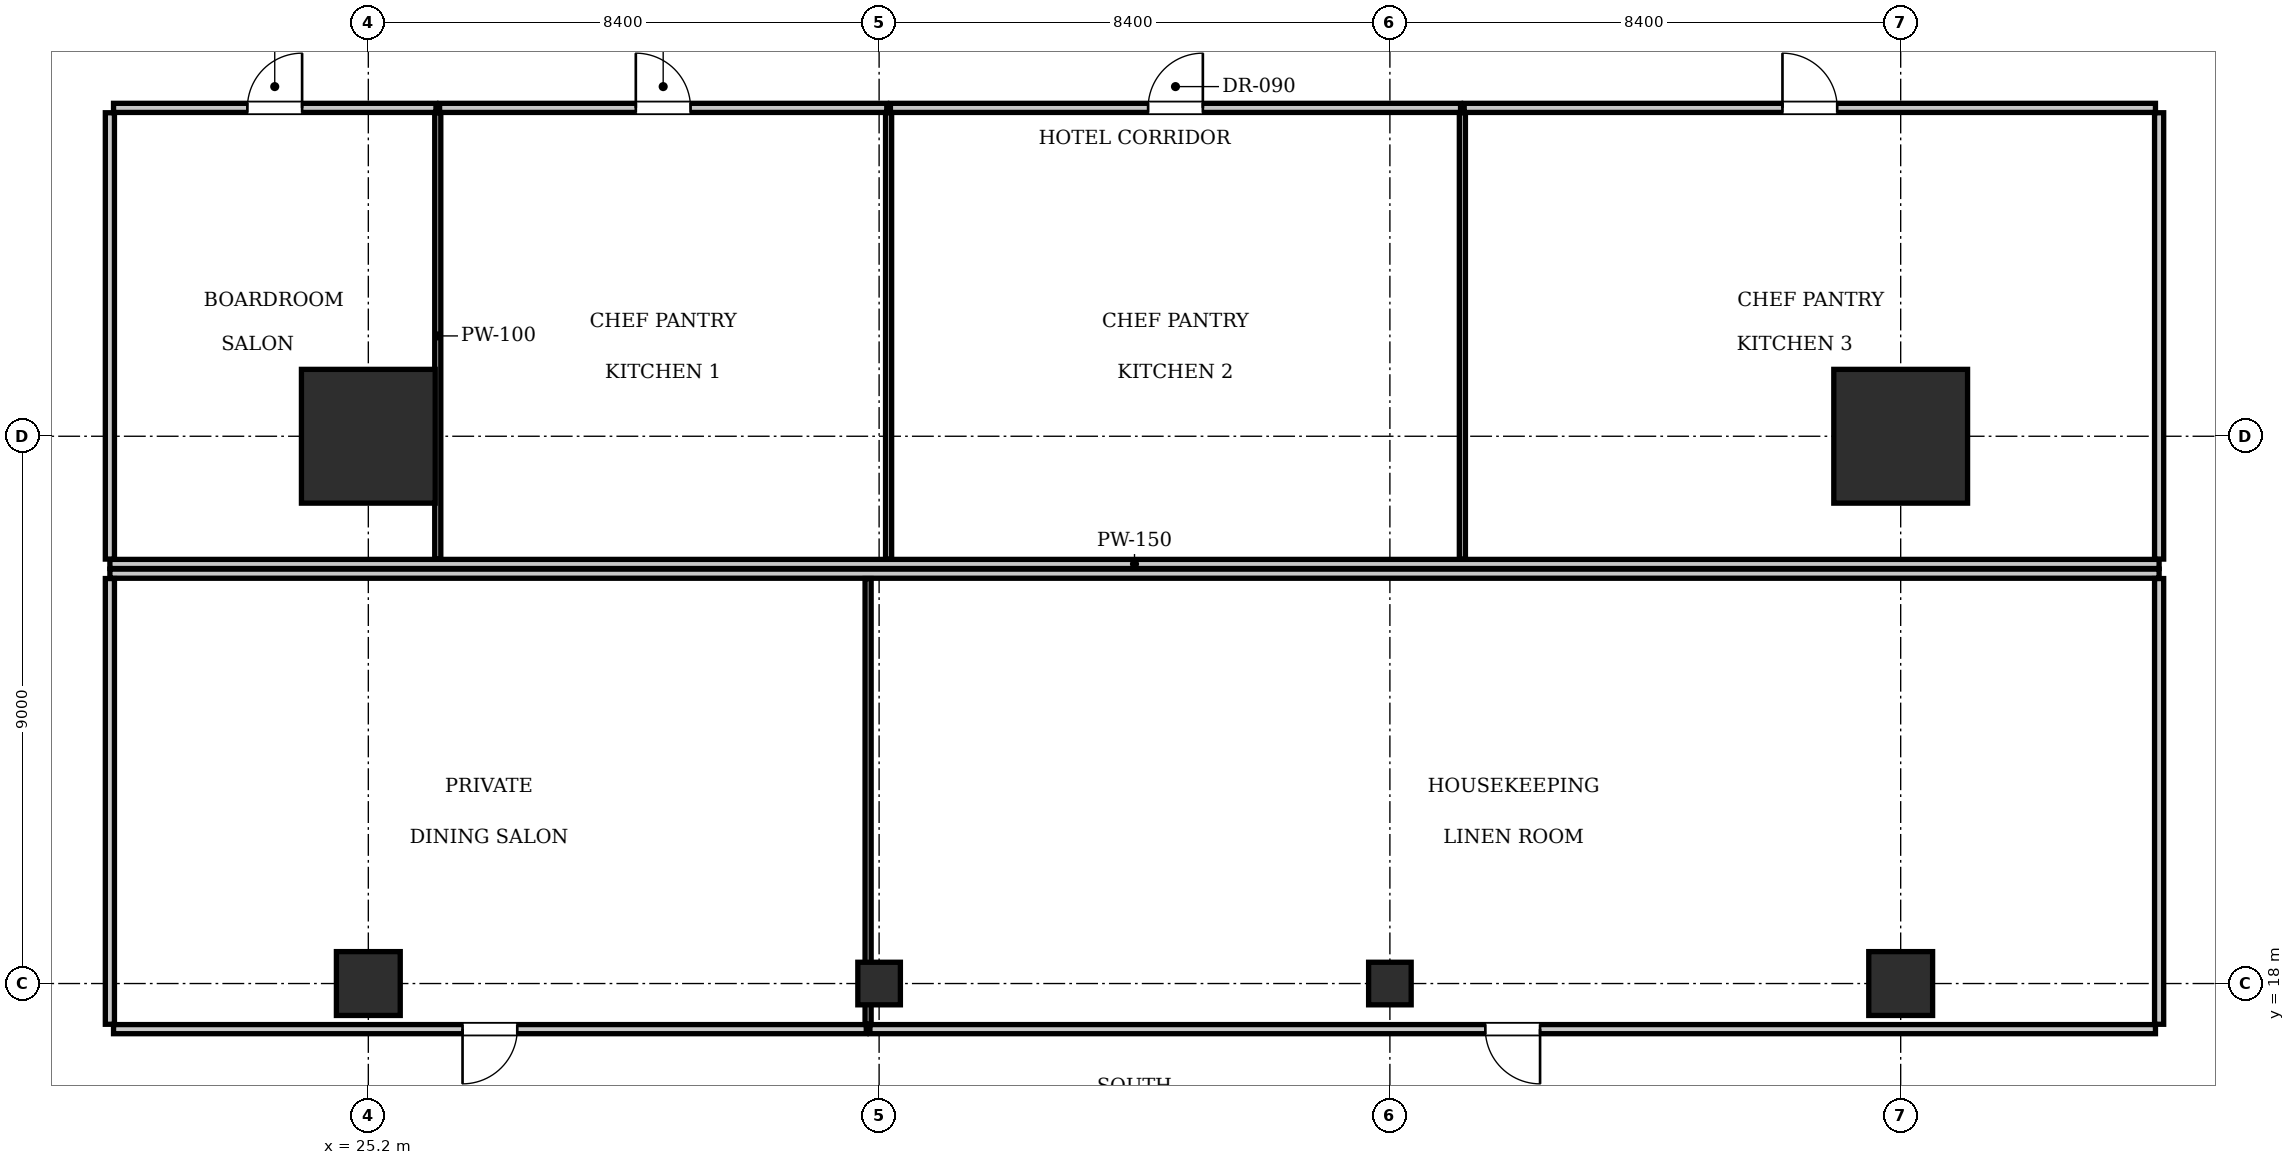
"""IFC4 building model, lengths in metres.
Left out: names, types, materials, properties, quantities, classifications, styles, units other than length and angle.
Written with IfcOpenShell. Run it as: python <this file> out.ifc"""

import sys

from ifc_helpers import new_model, si_unit, direction, frame, frame_2d, origin, origin_2d, place, context, subcontext, project, spatial, rectangle, i_section, extrude, element, fill, save


model = new_model("IFC4")
c1 = context("Model", 3, precision=1e-05, world=origin(), true_north=direction((0.0, 1.0)))
c2 = subcontext(c1, "Body", "Model", "MODEL_VIEW")
j1 = project(units=[si_unit("LENGTHUNIT", "METRE"), si_unit("PLANEANGLEUNIT", "RADIAN")], contexts=[c1])
p1 = place(None, origin())
s1 = spatial("IfcSite", under=j1, at=p1, CompositionType="ELEMENT")
p2 = place(p1, origin())
s2 = spatial("IfcBuilding", under=s1, at=p2, CompositionType="ELEMENT")
p3 = place(p2, frame((0.0, 0.0, 107.8)))
s3 = spatial("IfcBuildingStorey", under=s2, at=p3, CompositionType="ELEMENT", Elevation=107.8)
for number, where, z_axis, x_axis in (
    (1, (25.2, 27.0, 0.0), (0.0, 0.0, 1.0), (1.0, 0.0, 0.0)),
    (2, (50.4, 27.0, 0.0), (0.0, 0.0, 1.0), (1.0, 0.0, 0.0)),
):
    element("IfcColumn", number, at=place(p3, frame(where, z_axis=z_axis, x_axis=x_axis)), inside=s3, PredefinedType="COLUMN", context=c2, shape_type="SweptSolid", body=[
        extrude(rectangle(XDim=2.2, YDim=2.2, at=origin_2d()), origin(), (0.0, 0.0, 1.0), 3.85),
    ])
for number, where, z_axis, x_axis in (
    (3, (25.2, 18.0, 0.0), (0.0, 0.0, 1.0), (1.0, 0.0, 0.0)),
    (4, (50.4, 18.0, 0.0), (0.0, 0.0, 1.0), (1.0, 0.0, 0.0)),
):
    element("IfcColumn", number, at=place(p3, frame(where, z_axis=z_axis, x_axis=x_axis)), inside=s3, PredefinedType="COLUMN", context=c2, shape_type="SweptSolid", body=[
        extrude(rectangle(XDim=1.05, YDim=1.05, at=origin_2d()), origin(), (0.0, 0.0, 1.0), 3.85),
    ])
for number, where, z_axis, x_axis in (
    (5, (33.6, 18.0, 0.0), (0.0, 0.0, 1.0), (1.0, 0.0, 0.0)),
    (6, (42.0, 18.0, 0.0), (0.0, 0.0, 1.0), (1.0, 0.0, 0.0)),
):
    element("IfcColumn", number, at=place(p3, frame(where, z_axis=z_axis, x_axis=x_axis)), inside=s3, PredefinedType="COLUMN", context=c2, shape_type="SweptSolid", body=[
        extrude(i_section(OverallWidth=0.7, OverallDepth=0.7, WebThickness=0.028, FlangeThickness=0.044, at=origin_2d()), origin(), (0.0, 0.0, 1.0), 3.85),
    ])
p4 = place(p3, frame((20.95, 24.9, 0.0), z_axis=(0.0, 0.0, 1.0), x_axis=(1.0, 0.0, 0.0)))
e7 = element("IfcWall", 7, at=p4, inside=s3, PredefinedType="PARTITIONING", context=c2, shape_type="SweptSolid", body=[
    extrude(rectangle(XDim=33.7, YDim=0.15, at=frame_2d((16.85, 0.0))), origin(), (0.0, 0.0, 1.0), 3.61),
])
p5 = place(p3, frame((20.95, 24.98, 0.0), z_axis=(0.0, 0.0, 1.0), x_axis=(0.0, 1.0, 0.0)))
e8 = element("IfcWall", 8, at=p5, inside=s3, PredefinedType="PARTITIONING", context=c2, shape_type="SweptSolid", body=[
    extrude(rectangle(XDim=7.34, YDim=0.15, at=frame_2d((3.67, 0.0))), origin(), (0.0, 0.0, 1.0), 3.293),
])
p6 = place(p3, frame((54.65, 24.98, 0.0), z_axis=(0.0, 0.0, 1.0), x_axis=(0.0, 1.0, 0.0)))
e9 = element("IfcWall", 9, at=p6, inside=s3, PredefinedType="PARTITIONING", context=c2, shape_type="SweptSolid", body=[
    extrude(rectangle(XDim=7.34, YDim=0.15, at=frame_2d((3.67, 0.0))), origin(), (0.0, 0.0, 1.0), 3.3),
])
p7 = place(p3, frame((21.01, 32.4, 0.0), z_axis=(0.0, 0.0, 1.0), x_axis=(1.0, 0.0, 0.0)))
e10 = element("IfcWall", 10, at=p7, inside=s3, PredefinedType="PARTITIONING", context=c2, shape_type="SweptSolid", body=[
    extrude(rectangle(XDim=5.302, YDim=0.15, at=frame_2d((2.651, 0.0))), origin(), (0.0, 0.0, 1.0), 3.61),
])
p8 = place(p7, frame((2.201, 0.0, 0.0)))
e11 = element("IfcOpeningElement", 11, at=p8, cuts=e10, PredefinedType="OPENING", context=c2, shape_type="SweptSolid", body=[
    extrude(rectangle(XDim=0.9, YDim=2.1, at=frame_2d((0.45, 1.05))), frame((0.0, 0.085, 0.0), z_axis=(0.0, -1.0, 0.0), x_axis=(1.0, 0.0, 0.0)), (0.0, 0.0, 1.0), 0.17),
])
p9 = place(p3, frame((26.342, 24.98, 0.0), z_axis=(0.0, 0.0, 1.0), x_axis=(0.0, 1.0, 0.0)))
e12 = element("IfcWall", 12, at=p9, inside=s3, PredefinedType="PARTITIONING", context=c2, shape_type="SweptSolid", body=[
    extrude(rectangle(XDim=7.34, YDim=0.1, at=frame_2d((3.67, 0.0))), origin(), (0.0, 0.0, 1.0), 3.61),
])
p10 = place(p3, frame((26.372, 32.4, 0.0), z_axis=(0.0, 0.0, 1.0), x_axis=(1.0, 0.0, 0.0)))
e13 = element("IfcWall", 13, at=p10, inside=s3, PredefinedType="PARTITIONING", context=c2, shape_type="SweptSolid", body=[
    extrude(rectangle(XDim=7.354, YDim=0.15, at=frame_2d((3.677, 0.0))), origin(), (0.0, 0.0, 1.0), 3.61),
])
p11 = place(p10, frame((3.227, 0.0, 0.0)))
e14 = element("IfcOpeningElement", 14, at=p11, cuts=e13, PredefinedType="OPENING", context=c2, shape_type="SweptSolid", body=[
    extrude(rectangle(XDim=0.9, YDim=2.1, at=frame_2d((0.45, 1.05))), frame((0.0, 0.085, 0.0), z_axis=(0.0, -1.0, 0.0), x_axis=(1.0, 0.0, 0.0)), (0.0, 0.0, 1.0), 0.17),
])
p12 = place(p3, frame((33.756, 24.98, 0.0), z_axis=(0.0, 0.0, 1.0), x_axis=(0.0, 1.0, 0.0)))
e15 = element("IfcWall", 15, at=p12, inside=s3, PredefinedType="PARTITIONING", context=c2, shape_type="SweptSolid", body=[
    extrude(rectangle(XDim=7.34, YDim=0.1, at=frame_2d((3.67, 0.0))), origin(), (0.0, 0.0, 1.0), 2.999),
])
p13 = place(p3, frame((33.786, 32.4, 0.0), z_axis=(0.0, 0.0, 1.0), x_axis=(1.0, 0.0, 0.0)))
e16 = element("IfcWall", 16, at=p13, inside=s3, PredefinedType="PARTITIONING", context=c2, shape_type="SweptSolid", body=[
    extrude(rectangle(XDim=9.376, YDim=0.15, at=frame_2d((4.688, 0.0))), origin(), (0.0, 0.0, 1.0), 3.61),
])
p14 = place(p13, frame((4.238, 0.0, 0.0)))
e17 = element("IfcOpeningElement", 17, at=p14, cuts=e16, PredefinedType="OPENING", context=c2, shape_type="SweptSolid", body=[
    extrude(rectangle(XDim=0.9, YDim=2.1, at=frame_2d((0.45, 1.05))), frame((0.0, 0.085, 0.0), z_axis=(0.0, -1.0, 0.0), x_axis=(1.0, 0.0, 0.0)), (0.0, 0.0, 1.0), 0.17),
])
p15 = place(p3, frame((43.192, 24.98, 0.0), z_axis=(0.0, 0.0, 1.0), x_axis=(0.0, 1.0, 0.0)))
e18 = element("IfcWall", 18, at=p15, inside=s3, PredefinedType="PARTITIONING", context=c2, shape_type="SweptSolid", body=[
    extrude(rectangle(XDim=7.34, YDim=0.1, at=frame_2d((3.67, 0.0))), origin(), (0.0, 0.0, 1.0), 3.61),
])
p16 = place(p3, frame((43.222, 32.4, 0.0), z_axis=(0.0, 0.0, 1.0), x_axis=(1.0, 0.0, 0.0)))
e19 = element("IfcWall", 19, at=p16, inside=s3, PredefinedType="PARTITIONING", context=c2, shape_type="SweptSolid", body=[
    extrude(rectangle(XDim=11.368, YDim=0.15, at=frame_2d((5.684, 0.0))), origin(), (0.0, 0.0, 1.0), 3.61),
])
p17 = place(p16, frame((5.234, 0.0, 0.0)))
e20 = element("IfcOpeningElement", 20, at=p17, cuts=e19, PredefinedType="OPENING", context=c2, shape_type="SweptSolid", body=[
    extrude(rectangle(XDim=0.9, YDim=2.1, at=frame_2d((0.45, 1.05))), frame((0.0, 0.085, 0.0), z_axis=(0.0, -1.0, 0.0), x_axis=(1.0, 0.0, 0.0)), (0.0, 0.0, 1.0), 0.17),
])
p18 = place(p3, frame((20.95, 24.74, 0.0), z_axis=(0.0, 0.0, 1.0), x_axis=(1.0, 0.0, 0.0)))
e21 = element("IfcWall", 21, at=p18, inside=s3, PredefinedType="PARTITIONING", context=c2, shape_type="SweptSolid", body=[
    extrude(rectangle(XDim=33.7, YDim=0.15, at=frame_2d((16.85, 0.0))), origin(), (0.0, 0.0, 1.0), 3.61),
])
for number, where, z_axis, x_axis in (
    (22, (20.95, 17.33, 0.0), (0.0, 0.0, 1.0), (0.0, 1.0, 0.0)),
    (23, (54.65, 17.33, 0.0), (0.0, 0.0, 1.0), (0.0, 1.0, 0.0)),
):
    element("IfcWall", number, at=place(p3, frame(where, z_axis=z_axis, x_axis=x_axis)), inside=s3, PredefinedType="PARTITIONING", context=c2, shape_type="SweptSolid", body=[
        extrude(rectangle(XDim=7.33, YDim=0.15, at=frame_2d((3.665, 0.0))), origin(), (0.0, 0.0, 1.0), 3.293),
    ])
p19 = place(p3, frame((21.01, 17.25, 0.0), z_axis=(0.0, 0.0, 1.0), x_axis=(1.0, 0.0, 0.0)))
e24 = element("IfcWall", 24, at=p19, inside=s3, PredefinedType="PARTITIONING", context=c2, shape_type="SweptSolid", body=[
    extrude(rectangle(XDim=12.379, YDim=0.15, at=frame_2d((6.189, 0.0))), origin(), (0.0, 0.0, 1.0), 3.61),
])
p20 = place(p19, frame((5.74, 0.0, 0.0)))
e25 = element("IfcOpeningElement", 25, at=p20, cuts=e24, PredefinedType="OPENING", context=c2, shape_type="SweptSolid", body=[
    extrude(rectangle(XDim=0.9, YDim=2.1, at=frame_2d((0.45, 1.05))), frame((0.0, 0.085, 0.0), z_axis=(0.0, -1.0, 0.0), x_axis=(1.0, 0.0, 0.0)), (0.0, 0.0, 1.0), 0.17),
])
p21 = place(p3, frame((33.419, 17.33, 0.0), z_axis=(0.0, 0.0, 1.0), x_axis=(0.0, 1.0, 0.0)))
e26 = element("IfcWall", 26, at=p21, inside=s3, PredefinedType="PARTITIONING", context=c2, shape_type="SweptSolid", body=[
    extrude(rectangle(XDim=7.33, YDim=0.1, at=frame_2d((3.665, 0.0))), origin(), (0.0, 0.0, 1.0), 2.999),
])
p22 = place(p3, frame((33.449, 17.25, 0.0), z_axis=(0.0, 0.0, 1.0), x_axis=(1.0, 0.0, 0.0)))
e27 = element("IfcWall", 27, at=p22, inside=s3, PredefinedType="PARTITIONING", context=c2, shape_type="SweptSolid", body=[
    extrude(rectangle(XDim=21.141, YDim=0.15, at=frame_2d((10.571, 0.0))), origin(), (0.0, 0.0, 1.0), 3.61),
])
p23 = place(p22, frame((10.121, 0.0, 0.0)))
e28 = element("IfcOpeningElement", 28, at=p23, cuts=e27, PredefinedType="OPENING", context=c2, shape_type="SweptSolid", body=[
    extrude(rectangle(XDim=0.9, YDim=2.1, at=frame_2d((0.45, 1.05))), frame((0.0, 0.085, 0.0), z_axis=(0.0, -1.0, 0.0), x_axis=(1.0, 0.0, 0.0)), (0.0, 0.0, 1.0), 0.17),
])
p24 = place(p8, origin())
e29 = element("IfcDoor", 29, at=p24, inside=s3, OperationType="SINGLE_SWING_RIGHT", PredefinedType="DOOR", context=c2, shape_type="SweptSolid", body=[
    extrude(rectangle(XDim=0.9, YDim=2.1, at=frame_2d((0.45, 1.05))), frame((0.0, 0.025, 0.0), z_axis=(0.0, -1.0, 0.0), x_axis=(1.0, 0.0, 0.0)), (0.0, 0.0, 1.0), 0.05),
])
fill(e11, e29)
p25 = place(p11, origin())
e30 = element("IfcDoor", 30, at=p25, inside=s3, OperationType="SINGLE_SWING_LEFT", PredefinedType="DOOR", context=c2, shape_type="SweptSolid", body=[
    extrude(rectangle(XDim=0.9, YDim=2.1, at=frame_2d((0.45, 1.05))), frame((0.0, 0.025, 0.0), z_axis=(0.0, -1.0, 0.0), x_axis=(1.0, 0.0, 0.0)), (0.0, 0.0, 1.0), 0.05),
])
fill(e14, e30)
p26 = place(p14, origin())
e31 = element("IfcDoor", 31, at=p26, inside=s3, OperationType="SINGLE_SWING_RIGHT", PredefinedType="DOOR", context=c2, shape_type="SweptSolid", body=[
    extrude(rectangle(XDim=0.9, YDim=2.1, at=frame_2d((0.45, 1.05))), frame((0.0, 0.025, 0.0), z_axis=(0.0, -1.0, 0.0), x_axis=(1.0, 0.0, 0.0)), (0.0, 0.0, 1.0), 0.05),
])
fill(e17, e31)
p27 = place(p17, origin())
e32 = element("IfcDoor", 32, at=p27, inside=s3, OperationType="SINGLE_SWING_LEFT", PredefinedType="DOOR", context=c2, shape_type="SweptSolid", body=[
    extrude(rectangle(XDim=0.9, YDim=2.1, at=frame_2d((0.45, 1.05))), frame((0.0, 0.025, 0.0), z_axis=(0.0, -1.0, 0.0), x_axis=(1.0, 0.0, 0.0)), (0.0, 0.0, 1.0), 0.05),
])
fill(e20, e32)
p28 = place(p20, frame((0.9, 0.0, 0.0), z_axis=(0.0, 0.0, 1.0), x_axis=(-1.0, 0.0, 0.0)))
e33 = element("IfcDoor", 33, at=p28, inside=s3, OperationType="SINGLE_SWING_RIGHT", PredefinedType="DOOR", context=c2, shape_type="SweptSolid", body=[
    extrude(rectangle(XDim=0.9, YDim=2.1, at=frame_2d((0.45, 1.05))), frame((0.0, 0.025, 0.0), z_axis=(0.0, -1.0, 0.0), x_axis=(1.0, 0.0, 0.0)), (0.0, 0.0, 1.0), 0.05),
])
fill(e25, e33)
p29 = place(p23, frame((0.9, 0.0, 0.0), z_axis=(0.0, 0.0, 1.0), x_axis=(-1.0, 0.0, 0.0)))
e34 = element("IfcDoor", 34, at=p29, inside=s3, OperationType="SINGLE_SWING_LEFT", PredefinedType="DOOR", context=c2, shape_type="SweptSolid", body=[
    extrude(rectangle(XDim=0.9, YDim=2.1, at=frame_2d((0.45, 1.05))), frame((0.0, 0.025, 0.0), z_axis=(0.0, -1.0, 0.0), x_axis=(1.0, 0.0, 0.0)), (0.0, 0.0, 1.0), 0.05),
])
fill(e28, e34)
save(model, sys.argv[1])
